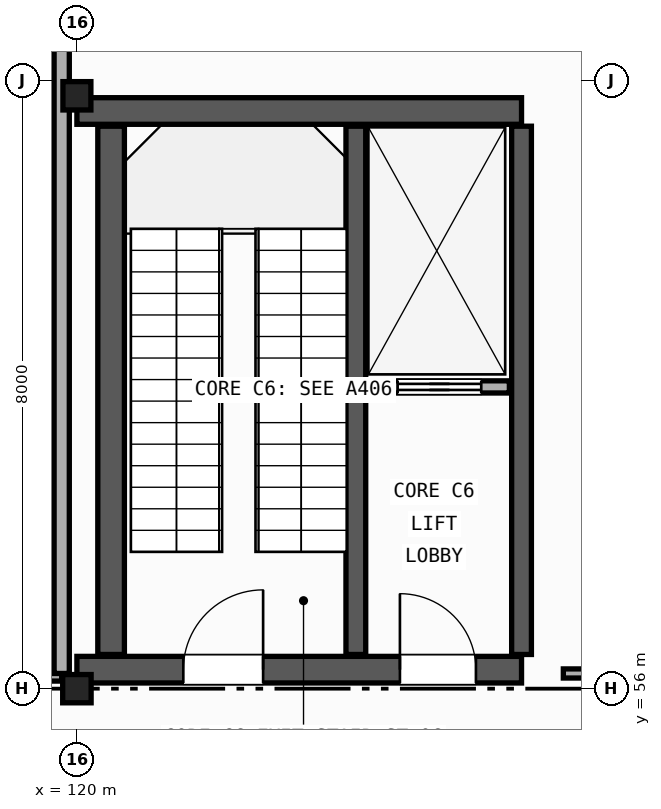
"""IFC4 building model, lengths in metres.
Left out: names, types, materials, properties, quantities, classifications, styles, units other than length and angle.
Written with IfcOpenShell. Run it as: python <this file> out.ifc"""

import sys

from ifc_helpers import new_model, si_unit, direction, frame, frame_2d, origin, origin_2d, place, context, subcontext, project, spatial, rectangle, i_section, extrude, element, fill, save


model = new_model("IFC4")
c1 = context("Model", 3, precision=1e-05, world=origin(), true_north=direction((0.0, 1.0)))
c2 = subcontext(c1, "Body", "Model", "MODEL_VIEW")
j1 = project(units=[si_unit("LENGTHUNIT", "METRE"), si_unit("PLANEANGLEUNIT", "RADIAN")], contexts=[c1])
p1 = place(None, origin())
s1 = spatial("IfcSite", under=j1, at=p1, CompositionType="ELEMENT")
p2 = place(p1, origin())
s2 = spatial("IfcBuilding", under=s1, at=p2, CompositionType="ELEMENT")
p3 = place(p2, origin())
s3 = spatial("IfcBuildingStorey", under=s2, at=p3, CompositionType="ELEMENT", Elevation=0.0)
p4 = place(p3, frame((120.0, 56.0, 0.0), z_axis=(0.0, 0.0, 1.0), x_axis=(1.0, 0.0, 0.0)))
e1 = element("IfcColumn", 1, at=p4, inside=s3, PredefinedType="COLUMN", context=c2, shape_type="SweptSolid", body=[
    extrude(i_section(OverallWidth=0.374, OverallDepth=0.372, WebThickness=0.016, FlangeThickness=0.026, FilletRadius=0.015, at=origin_2d()), origin(), (0.0, 0.0, 1.0), 5.12),
])
p5 = place(p3, frame((120.0, 63.8, 0.0), z_axis=(0.0, 0.0, 1.0), x_axis=(0.0, 1.0, 0.0)))
e2 = element("IfcColumn", 2, at=p5, inside=s3, PredefinedType="COLUMN", context=c2, shape_type="SweptSolid", body=[
    extrude(i_section(OverallWidth=0.373, OverallDepth=0.368, WebThickness=0.015, FlangeThickness=0.024, FilletRadius=0.015, at=origin_2d()), origin(), (0.0, 0.0, 1.0), 5.12),
])
p6 = place(p3, frame((120.0, 56.25, 0.0), z_axis=(0.0, 0.0, 1.0), x_axis=(1.0, 0.0, 0.0)))
e3 = element("IfcWall", 3, at=p6, inside=s3, PredefinedType="SHEAR", context=c2, shape_type="SweptSolid", body=[
    extrude(rectangle(XDim=5.85, YDim=0.35, at=frame_2d((2.925, 0.0))), origin(), (0.0, 0.0, 1.0), 5.11),
])
p7 = place(p6, frame((1.4, 0.0, 0.0)))
e4 = element("IfcOpeningElement", 4, at=p7, cuts=e3, PredefinedType="OPENING", context=c2, shape_type="SweptSolid", body=[
    extrude(rectangle(XDim=1.05, YDim=2.1, at=frame_2d((0.525, 1.05))), frame((0.0, 0.185, 0.0), z_axis=(0.0, -1.0, 0.0), x_axis=(1.0, 0.0, 0.0)), (0.0, 0.0, 1.0), 0.37),
])
p8 = place(p6, frame((4.25, 0.0, 0.0)))
e5 = element("IfcOpeningElement", 5, at=p8, cuts=e3, PredefinedType="OPENING", context=c2, shape_type="SweptSolid", body=[
    extrude(rectangle(XDim=1.0, YDim=2.15, at=frame_2d((0.5, 1.075))), frame((0.0, 0.185, 0.0), z_axis=(0.0, -1.0, 0.0), x_axis=(1.0, 0.0, 0.0)), (0.0, 0.0, 1.0), 0.37),
])
p9 = place(p3, frame((120.0, 63.6, 0.0), z_axis=(0.0, 0.0, 1.0), x_axis=(1.0, 0.0, 0.0)))
e6 = element("IfcWall", 6, at=p9, inside=s3, PredefinedType="SHEAR", context=c2, shape_type="SweptSolid", body=[
    extrude(rectangle(XDim=5.85, YDim=0.35, at=frame_2d((2.925, 0.0))), origin(), (0.0, 0.0, 1.0), 5.11),
])
p10 = place(p3, frame((120.45, 56.45, 0.0), z_axis=(0.0, 0.0, 1.0), x_axis=(0.0, 1.0, 0.0)))
e7 = element("IfcWall", 7, at=p10, inside=s3, PredefinedType="SHEAR", context=c2, shape_type="SweptSolid", body=[
    extrude(rectangle(XDim=6.95, YDim=0.35, at=frame_2d((3.475, 0.0))), origin(), (0.0, 0.0, 1.0), 5.11),
])
for number, where, z_axis, x_axis in (
    (8, (125.85, 56.45, 0.0), (0.0, 0.0, 1.0), (0.0, 1.0, 0.0)),
    (9, (123.67, 56.45, 0.0), (0.0, 0.0, 1.0), (0.0, 1.0, 0.0)),
):
    element("IfcWall", number, at=place(p3, frame(where, z_axis=z_axis, x_axis=x_axis)), inside=s3, PredefinedType="SHEAR", context=c2, shape_type="SweptSolid", body=[
        extrude(rectangle(XDim=6.95, YDim=0.26, at=frame_2d((3.475, 0.0))), origin(), (0.0, 0.0, 1.0), 5.11),
    ])
p11 = place(p3, frame((123.85, 59.97, 0.0), z_axis=(0.0, 0.0, 1.0), x_axis=(1.0, 0.0, 0.0)))
e10 = element("IfcWall", 10, at=p11, inside=s3, PredefinedType="PARTITIONING", context=c2, shape_type="SweptSolid", body=[
    extrude(rectangle(XDim=1.84, YDim=0.16, at=frame_2d((0.92, 0.0))), origin(), (0.0, 0.0, 1.0), 3.6),
])
p12 = place(p11, frame((0.37, 0.0, 0.0)))
e11 = element("IfcOpeningElement", 11, at=p12, cuts=e10, PredefinedType="OPENING", context=c2, shape_type="SweptSolid", body=[
    extrude(rectangle(XDim=1.1, YDim=2.15, at=frame_2d((0.55, 1.075))), frame((0.0, 0.09, 0.0), z_axis=(0.0, -1.0, 0.0), x_axis=(1.0, 0.0, 0.0)), (0.0, 0.0, 1.0), 0.18),
])
p13 = place(p3, frame((126.4, 56.2, 0.0), z_axis=(0.0, 0.0, 1.0), x_axis=(1.0, 0.0, 0.0)))
e12 = element("IfcWall", 12, at=p13, inside=s3, PredefinedType="PARTITIONING", context=c2, shape_type="SweptSolid", body=[
    extrude(rectangle(XDim=16.8, YDim=0.12, at=frame_2d((8.4, 0.0))), origin(), (0.0, 0.0, 1.0), 4.29),
])
p14 = place(p13, frame((5.059, 0.0, 0.0)))
e13 = element("IfcOpeningElement", 13, at=p14, cuts=e12, PredefinedType="OPENING", context=c2, shape_type="SweptSolid", body=[
    extrude(rectangle(XDim=1.35, YDim=2.25, at=frame_2d((0.675, 1.125))), frame((0.0, 0.07, 0.0), z_axis=(0.0, -1.0, 0.0), x_axis=(1.0, 0.0, 0.0)), (0.0, 0.0, 1.0), 0.14),
])
p15 = place(p3, frame((113.0, 56.2, 0.0), z_axis=(0.0, 0.0, 1.0), x_axis=(1.0, 0.0, 0.0)))
e14 = element("IfcWall", 14, at=p15, inside=s3, PredefinedType="PLUMBINGWALL", context=c2, shape_type="SweptSolid", body=[
    extrude(rectangle(XDim=6.8, YDim=0.2, at=frame_2d((3.4, 0.0))), origin(), (0.0, 0.0, 1.0), 4.29),
])
p16 = place(p15, frame((2.945, 0.0, 0.0)))
e15 = element("IfcOpeningElement", 15, at=p16, cuts=e14, PredefinedType="OPENING", context=c2, shape_type="SweptSolid", body=[
    extrude(rectangle(XDim=0.91, YDim=2.1, at=frame_2d((0.455, 1.05))), frame((0.0, 0.11, 0.0), z_axis=(0.0, -1.0, 0.0), x_axis=(1.0, 0.0, 0.0)), (0.0, 0.0, 1.0), 0.22),
])
p17 = place(p3, frame((119.8, 56.2, 0.0), z_axis=(0.0, 0.0, 1.0), x_axis=(0.0, 1.0, 0.0)))
e16 = element("IfcWall", 16, at=p17, inside=s3, PredefinedType="PLUMBINGWALL", context=c2, shape_type="SweptSolid", body=[
    extrude(rectangle(XDim=15.0, YDim=0.2, at=frame_2d((7.5, 0.0))), origin(), (0.0, 0.0, 1.0), 4.29),
])
p18 = place(p12, origin())
e17 = element("IfcDoor", 17, at=p18, inside=s3, OperationType="SLIDING_TO_LEFT", PredefinedType="DOOR", context=c2, shape_type="SweptSolid", body=[
    extrude(rectangle(XDim=1.1, YDim=2.15, at=frame_2d((0.55, 1.075))), frame((0.0, 0.025, 0.0), z_axis=(0.0, -1.0, 0.0), x_axis=(1.0, 0.0, 0.0)), (0.0, 0.0, 1.0), 0.05),
])
fill(e11, e17)
p19 = place(p7, origin())
e18 = element("IfcDoor", 18, at=p19, inside=s3, OperationType="SINGLE_SWING_RIGHT", PredefinedType="DOOR", context=c2, shape_type="SweptSolid", body=[
    extrude(rectangle(XDim=1.05, YDim=2.1, at=frame_2d((0.525, 1.05))), frame((0.0, 0.025, 0.0), z_axis=(0.0, -1.0, 0.0), x_axis=(1.0, 0.0, 0.0)), (0.0, 0.0, 1.0), 0.05),
])
fill(e4, e18)
p20 = place(p8, origin())
e19 = element("IfcDoor", 19, at=p20, inside=s3, OperationType="SINGLE_SWING_LEFT", PredefinedType="DOOR", context=c2, shape_type="SweptSolid", body=[
    extrude(rectangle(XDim=1.0, YDim=2.15, at=frame_2d((0.5, 1.075))), frame((0.0, 0.025, 0.0), z_axis=(0.0, -1.0, 0.0), x_axis=(1.0, 0.0, 0.0)), (0.0, 0.0, 1.0), 0.05),
])
fill(e5, e19)
save(model, sys.argv[1])
